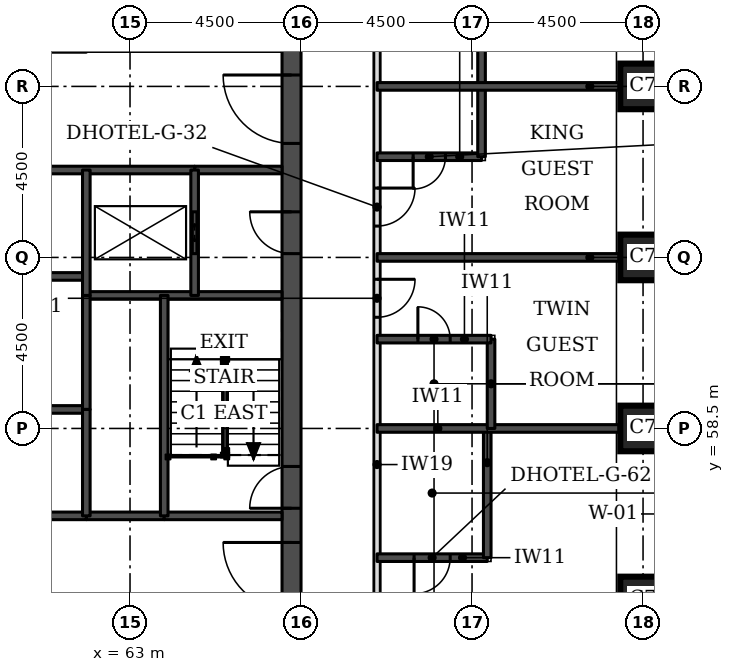
"""IFC4 building model, lengths in metres.
Left out: names, types, materials, properties, quantities, classifications, styles, units other than length and angle.
Written with IfcOpenShell. Run it as: python <this file> out.ifc"""

import sys

from ifc_helpers import new_model, si_unit, direction, frame, frame_2d, origin, origin_2d, place, context, subcontext, project, spatial, rectangle, extrude, element, fill, save


model = new_model("IFC4")
c1 = context("Model", 3, precision=1e-05, world=origin(), true_north=direction((0.0, 1.0)))
c2 = subcontext(c1, "Body", "Model", "MODEL_VIEW")
j1 = project(units=[si_unit("LENGTHUNIT", "METRE"), si_unit("PLANEANGLEUNIT", "RADIAN")], contexts=[c1])
p1 = place(None, origin())
s1 = spatial("IfcSite", under=j1, at=p1, CompositionType="ELEMENT")
p2 = place(p1, origin())
s2 = spatial("IfcBuilding", under=s1, at=p2, CompositionType="ELEMENT")
p3 = place(p2, frame((0.0, 0.0, 66.0)))
s3 = spatial("IfcBuildingStorey", under=s2, at=p3, CompositionType="ELEMENT", Elevation=66.0)
for number, where, z_axis, x_axis in (
    (1, (76.5, 54.0, 0.0), (0.0, 0.0, 1.0), (1.0, 0.0, 0.0)),
    (2, (76.5, 58.5, 0.0), (0.0, 0.0, 1.0), (1.0, 0.0, 0.0)),
    (3, (76.5, 63.0, 0.0), (0.0, 0.0, 1.0), (1.0, 0.0, 0.0)),
    (4, (76.5, 67.5, 0.0), (0.0, 0.0, 1.0), (1.0, 0.0, 0.0)),
):
    element("IfcColumn", number, at=place(p3, frame(where, z_axis=z_axis, x_axis=x_axis)), inside=s3, PredefinedType="COLUMN", context=c2, shape_type="SweptSolid", body=[
        extrude(rectangle(XDim=1.2, YDim=1.2, at=origin_2d()), origin(), (0.0, 0.0, 1.0), 3.3),
    ])
p4 = place(p3, frame((67.25, 49.5, 0.0), z_axis=(0.0, 0.0, 1.0), x_axis=(0.0, 1.0, 0.0)))
e5 = element("IfcWall", 5, at=p4, inside=s3, PredefinedType="SHEAR", context=c2, shape_type="SweptSolid", body=[
    extrude(rectangle(XDim=22.5, YDim=0.5, at=frame_2d((11.25, 0.0))), origin(), (0.0, 0.0, 1.0), 3.3),
])
p5 = place(p4, frame((4.2, 0.0, 0.0)))
e6 = element("IfcOpeningElement", 6, at=p5, cuts=e5, PredefinedType="OPENING", context=c2, shape_type="SweptSolid", body=[
    extrude(rectangle(XDim=1.8, YDim=2.1, at=frame_2d((0.9, 1.05))), frame((0.0, 0.26, 0.0), z_axis=(0.0, -1.0, 0.0), x_axis=(1.0, 0.0, 0.0)), (0.0, 0.0, 1.0), 0.52),
])
p6 = place(p4, frame((6.9, 0.0, 0.0)))
e7 = element("IfcOpeningElement", 7, at=p6, cuts=e5, PredefinedType="OPENING", context=c2, shape_type="SweptSolid", body=[
    extrude(rectangle(XDim=1.1, YDim=2.1, at=frame_2d((0.55, 1.05))), frame((0.0, 0.26, 0.0), z_axis=(0.0, -1.0, 0.0), x_axis=(1.0, 0.0, 0.0)), (0.0, 0.0, 1.0), 0.52),
])
p7 = place(p4, frame((13.6, 0.0, 0.0)))
e8 = element("IfcOpeningElement", 8, at=p7, cuts=e5, PredefinedType="OPENING", context=c2, shape_type="SweptSolid", body=[
    extrude(rectangle(XDim=1.1, YDim=2.1, at=frame_2d((0.55, 1.05))), frame((0.0, 0.26, 0.0), z_axis=(0.0, -1.0, 0.0), x_axis=(1.0, 0.0, 0.0)), (0.0, 0.0, 1.0), 0.52),
])
p8 = place(p4, frame((16.5, 0.0, 0.0)))
e9 = element("IfcOpeningElement", 9, at=p8, cuts=e5, PredefinedType="OPENING", context=c2, shape_type="SweptSolid", body=[
    extrude(rectangle(XDim=1.8, YDim=2.1, at=frame_2d((0.9, 1.05))), frame((0.0, 0.26, 0.0), z_axis=(0.0, -1.0, 0.0), x_axis=(1.0, 0.0, 0.0)), (0.0, 0.0, 1.0), 0.52),
])
p9 = place(p3, frame((69.5, 47.5, 0.0), z_axis=(0.0, 0.0, 1.0), x_axis=(0.0, 1.0, 0.0)))
e10 = element("IfcWall", 10, at=p9, inside=s3, PredefinedType="PARTITIONING", context=c2, shape_type="SweptSolid", body=[
    extrude(rectangle(XDim=26.5, YDim=0.15, at=frame_2d((13.25, 0.0))), origin(), (0.0, 0.0, 1.0), 3.08),
])
p10 = place(p9, frame((25.053, 0.0, 0.0)))
e11 = element("IfcOpeningElement", 11, at=p10, cuts=e10, PredefinedType="OPENING", context=c2, shape_type="SweptSolid", body=[
    extrude(rectangle(XDim=1.0, YDim=2.1, at=frame_2d((0.5, 1.05))), frame((0.0, 0.085, 0.0), z_axis=(0.0, -1.0, 0.0), x_axis=(1.0, 0.0, 0.0)), (0.0, 0.0, 1.0), 0.17),
])
p11 = place(p9, frame((22.925, 0.0, 0.0)))
e12 = element("IfcOpeningElement", 12, at=p11, cuts=e10, PredefinedType="OPENING", context=c2, shape_type="SweptSolid", body=[
    extrude(rectangle(XDim=1.0, YDim=2.1, at=frame_2d((0.5, 1.05))), frame((0.0, 0.085, 0.0), z_axis=(0.0, -1.0, 0.0), x_axis=(1.0, 0.0, 0.0)), (0.0, 0.0, 1.0), 0.17),
])
p12 = place(p9, frame((16.325, 0.0, 0.0)))
e13 = element("IfcOpeningElement", 13, at=p12, cuts=e10, PredefinedType="OPENING", context=c2, shape_type="SweptSolid", body=[
    extrude(rectangle(XDim=1.0, YDim=2.1, at=frame_2d((0.5, 1.05))), frame((0.0, 0.085, 0.0), z_axis=(0.0, -1.0, 0.0), x_axis=(1.0, 0.0, 0.0)), (0.0, 0.0, 1.0), 0.17),
])
p13 = place(p9, frame((13.925, 0.0, 0.0)))
e14 = element("IfcOpeningElement", 14, at=p13, cuts=e10, PredefinedType="OPENING", context=c2, shape_type="SweptSolid", body=[
    extrude(rectangle(XDim=1.0, YDim=2.1, at=frame_2d((0.5, 1.05))), frame((0.0, 0.085, 0.0), z_axis=(0.0, -1.0, 0.0), x_axis=(1.0, 0.0, 0.0)), (0.0, 0.0, 1.0), 0.17),
])
p14 = place(p9, frame((4.25, 0.0, 0.0)))
e15 = element("IfcOpeningElement", 15, at=p14, cuts=e10, PredefinedType="OPENING", context=c2, shape_type="SweptSolid", body=[
    extrude(rectangle(XDim=1.1, YDim=2.1, at=frame_2d((0.55, 1.05))), frame((0.0, 0.085, 0.0), z_axis=(0.0, -1.0, 0.0), x_axis=(1.0, 0.0, 0.0)), (0.0, 0.0, 1.0), 0.17),
])
p15 = place(p9, frame((0.447, 0.0, 0.0)))
e16 = element("IfcOpeningElement", 16, at=p15, cuts=e10, PredefinedType="OPENING", context=c2, shape_type="SweptSolid", body=[
    extrude(rectangle(XDim=1.0, YDim=2.1, at=frame_2d((0.5, 1.05))), frame((0.0, 0.085, 0.0), z_axis=(0.0, -1.0, 0.0), x_axis=(1.0, 0.0, 0.0)), (0.0, 0.0, 1.0), 0.17),
])
p16 = place(p3, frame((69.5, 55.1, 0.0), z_axis=(0.0, 0.0, 1.0), x_axis=(1.0, 0.0, 0.0)))
e17 = element("IfcWall", 17, at=p16, inside=s3, PredefinedType="SOLIDWALL", context=c2, shape_type="SweptSolid", body=[
    extrude(rectangle(XDim=2.9, YDim=0.2, at=frame_2d((1.45, 0.0))), origin(), (0.0, 0.0, 1.0), 3.08),
])
p17 = place(p16, frame((0.975, 0.0, 0.0)))
e18 = element("IfcOpeningElement", 18, at=p17, cuts=e17, PredefinedType="OPENING", context=c2, shape_type="SweptSolid", body=[
    extrude(rectangle(XDim=0.95, YDim=2.1, at=frame_2d((0.475, 1.05))), frame((0.0, 0.11, 0.0), z_axis=(0.0, -1.0, 0.0), x_axis=(1.0, 0.0, 0.0)), (0.0, 0.0, 1.0), 0.22),
])
p18 = place(p3, frame((72.4, 55.1, 0.0), z_axis=(0.0, 0.0, 1.0), x_axis=(0.0, 1.0, 0.0)))
e19 = element("IfcWall", 19, at=p18, inside=s3, PredefinedType="SOLIDWALL", context=c2, shape_type="SweptSolid", body=[
    extrude(rectangle(XDim=3.4, YDim=0.2, at=frame_2d((1.7, 0.0))), origin(), (0.0, 0.0, 1.0), 3.08),
])
p19 = place(p3, frame((69.5, 58.5, 0.0), z_axis=(0.0, 0.0, 1.0), x_axis=(1.0, 0.0, 0.0)))
e20 = element("IfcWall", 20, at=p19, inside=s3, PredefinedType="SOLIDWALL", context=c2, shape_type="SweptSolid", body=[
    extrude(rectangle(XDim=6.4, YDim=0.2, at=frame_2d((3.2, 0.0))), origin(), (0.0, 0.0, 1.0), 3.08),
])
p20 = place(p3, frame((72.5, 58.5, 0.0), z_axis=(0.0, 0.0, 1.0), x_axis=(0.0, 1.0, 0.0)))
e21 = element("IfcWall", 21, at=p20, inside=s3, PredefinedType="SOLIDWALL", context=c2, shape_type="SweptSolid", body=[
    extrude(rectangle(XDim=2.35, YDim=0.2, at=frame_2d((1.175, 0.0))), origin(), (0.0, 0.0, 1.0), 3.08),
])
p21 = place(p3, frame((69.5, 60.85, 0.0), z_axis=(0.0, 0.0, 1.0), x_axis=(1.0, 0.0, 0.0)))
e22 = element("IfcWall", 22, at=p21, inside=s3, PredefinedType="SOLIDWALL", context=c2, shape_type="SweptSolid", body=[
    extrude(rectangle(XDim=3.0, YDim=0.2, at=frame_2d((1.5, 0.0))), origin(), (0.0, 0.0, 1.0), 3.08),
])
p22 = place(p21, frame((1.075, 0.0, 0.0)))
e23 = element("IfcOpeningElement", 23, at=p22, cuts=e22, PredefinedType="OPENING", context=c2, shape_type="SweptSolid", body=[
    extrude(rectangle(XDim=0.85, YDim=2.1, at=frame_2d((0.425, 1.05))), frame((0.0, 0.11, 0.0), z_axis=(0.0, -1.0, 0.0), x_axis=(1.0, 0.0, 0.0)), (0.0, 0.0, 1.0), 0.22),
])
p23 = place(p3, frame((69.5, 63.0, 0.0), z_axis=(0.0, 0.0, 1.0), x_axis=(1.0, 0.0, 0.0)))
e24 = element("IfcWall", 24, at=p23, inside=s3, PredefinedType="SOLIDWALL", context=c2, shape_type="SweptSolid", body=[
    extrude(rectangle(XDim=6.4, YDim=0.2, at=frame_2d((3.2, 0.0))), origin(), (0.0, 0.0, 1.0), 3.08),
])
p24 = place(p3, frame((69.5, 65.65, 0.0), z_axis=(0.0, 0.0, 1.0), x_axis=(1.0, 0.0, 0.0)))
e25 = element("IfcWall", 25, at=p24, inside=s3, PredefinedType="SOLIDWALL", context=c2, shape_type="SweptSolid", body=[
    extrude(rectangle(XDim=2.75, YDim=0.2, at=frame_2d((1.375, 0.0))), origin(), (0.0, 0.0, 1.0), 3.08),
])
p25 = place(p24, frame((0.95, 0.0, 0.0)))
e26 = element("IfcOpeningElement", 26, at=p25, cuts=e25, PredefinedType="OPENING", context=c2, shape_type="SweptSolid", body=[
    extrude(rectangle(XDim=0.85, YDim=2.1, at=frame_2d((0.425, 1.05))), frame((0.0, 0.11, 0.0), z_axis=(0.0, -1.0, 0.0), x_axis=(1.0, 0.0, 0.0)), (0.0, 0.0, 1.0), 0.22),
])
p26 = place(p3, frame((72.25, 65.65, 0.0), z_axis=(0.0, 0.0, 1.0), x_axis=(0.0, 1.0, 0.0)))
e27 = element("IfcWall", 27, at=p26, inside=s3, PredefinedType="SOLIDWALL", context=c2, shape_type="SweptSolid", body=[
    extrude(rectangle(XDim=4.2, YDim=0.2, at=frame_2d((2.1, 0.0))), origin(), (0.0, 0.0, 1.0), 3.08),
])
p27 = place(p3, frame((69.5, 67.5, 0.0), z_axis=(0.0, 0.0, 1.0), x_axis=(1.0, 0.0, 0.0)))
e28 = element("IfcWall", 28, at=p27, inside=s3, PredefinedType="SOLIDWALL", context=c2, shape_type="SweptSolid", body=[
    extrude(rectangle(XDim=6.4, YDim=0.2, at=frame_2d((3.2, 0.0))), origin(), (0.0, 0.0, 1.0), 3.08),
])
p28 = place(p3, frame((61.85, 56.2, 0.0), z_axis=(0.0, 0.0, 1.0), x_axis=(1.0, 0.0, 0.0)))
e29 = element("IfcWall", 29, at=p28, inside=s3, PredefinedType="SOLIDWALL", context=c2, shape_type="SweptSolid", body=[
    extrude(rectangle(XDim=2.05, YDim=0.2, at=frame_2d((1.025, 0.0))), origin(), (0.0, 0.0, 1.0), 3.08),
])
p29 = place(p3, frame((50.65, 56.2, 0.0), z_axis=(0.0, 0.0, 1.0), x_axis=(1.0, 0.0, 0.0)))
e30 = element("IfcWall", 30, at=p29, inside=s3, PredefinedType="SOLIDWALL", context=c2, shape_type="SweptSolid", body=[
    extrude(rectangle(XDim=11.2, YDim=0.2, at=frame_2d((5.6, 0.0))), origin(), (0.0, 0.0, 1.0), 3.08),
])
p30 = place(p3, frame((63.9, 56.2, 0.0), z_axis=(0.0, 0.0, 1.0), x_axis=(1.0, 0.0, 0.0)))
e31 = element("IfcWall", 31, at=p30, inside=s3, PredefinedType="SOLIDWALL", context=c2, shape_type="SweptSolid", body=[
    extrude(rectangle(XDim=3.1, YDim=0.2, at=frame_2d((1.55, 0.0))), origin(), (0.0, 0.0, 1.0), 3.08),
])
p31 = place(p3, frame((50.65, 59.0, 0.0), z_axis=(0.0, 0.0, 1.0), x_axis=(1.0, 0.0, 0.0)))
e32 = element("IfcWall", 32, at=p31, inside=s3, PredefinedType="SOLIDWALL", context=c2, shape_type="SweptSolid", body=[
    extrude(rectangle(XDim=11.2, YDim=0.2, at=frame_2d((5.6, 0.0))), origin(), (0.0, 0.0, 1.0), 3.3),
])
p32 = place(p3, frame((61.85, 62.0, 0.0), z_axis=(0.0, 0.0, 1.0), x_axis=(1.0, 0.0, 0.0)))
e33 = element("IfcWall", 33, at=p32, inside=s3, PredefinedType="SOLIDWALL", context=c2, shape_type="SweptSolid", body=[
    extrude(rectangle(XDim=5.15, YDim=0.2, at=frame_2d((2.575, 0.0))), origin(), (0.0, 0.0, 1.0), 3.08),
])
p33 = place(p3, frame((50.65, 62.5, 0.0), z_axis=(0.0, 0.0, 1.0), x_axis=(1.0, 0.0, 0.0)))
e34 = element("IfcWall", 34, at=p33, inside=s3, PredefinedType="SOLIDWALL", context=c2, shape_type="SweptSolid", body=[
    extrude(rectangle(XDim=11.2, YDim=0.2, at=frame_2d((5.6, 0.0))), origin(), (0.0, 0.0, 1.0), 3.3),
])
p34 = place(p3, frame((64.7, 65.3, 0.0), z_axis=(0.0, 0.0, 1.0), x_axis=(1.0, 0.0, 0.0)))
e35 = element("IfcWall", 35, at=p34, inside=s3, PredefinedType="SOLIDWALL", context=c2, shape_type="SweptSolid", body=[
    extrude(rectangle(XDim=2.3, YDim=0.2, at=frame_2d((1.15, 0.0))), origin(), (0.0, 0.0, 1.0), 3.08),
])
p35 = place(p3, frame((47.8, 65.3, 0.0), z_axis=(0.0, 0.0, 1.0), x_axis=(1.0, 0.0, 0.0)))
e36 = element("IfcWall", 36, at=p35, inside=s3, PredefinedType="SOLIDWALL", context=c2, shape_type="SweptSolid", body=[
    extrude(rectangle(XDim=16.9, YDim=0.2, at=frame_2d((8.45, 0.0))), origin(), (0.0, 0.0, 1.0), 3.08),
])
p36 = place(p3, frame((61.85, 59.0, 0.0), z_axis=(0.0, 0.0, 1.0), x_axis=(0.0, 1.0, 0.0)))
e37 = element("IfcWall", 37, at=p36, inside=s3, PredefinedType="SOLIDWALL", context=c2, shape_type="SweptSolid", body=[
    extrude(rectangle(XDim=3.0, YDim=0.2, at=frame_2d((1.5, 0.0))), origin(), (0.0, 0.0, 1.0), 3.3),
])
p37 = place(p3, frame((61.85, 56.2, 0.0), z_axis=(0.0, 0.0, 1.0), x_axis=(0.0, 1.0, 0.0)))
e38 = element("IfcWall", 38, at=p37, inside=s3, PredefinedType="SOLIDWALL", context=c2, shape_type="SweptSolid", body=[
    extrude(rectangle(XDim=2.8, YDim=0.2, at=frame_2d((1.4, 0.0))), origin(), (0.0, 0.0, 1.0), 3.08),
])
p38 = place(p3, frame((61.85, 62.0, 0.0), z_axis=(0.0, 0.0, 1.0), x_axis=(0.0, 1.0, 0.0)))
e39 = element("IfcWall", 39, at=p38, inside=s3, PredefinedType="SOLIDWALL", context=c2, shape_type="SweptSolid", body=[
    extrude(rectangle(XDim=3.3, YDim=0.2, at=frame_2d((1.65, 0.0))), origin(), (0.0, 0.0, 1.0), 3.08),
])
p39 = place(p3, frame((63.9, 56.2, 0.0), z_axis=(0.0, 0.0, 1.0), x_axis=(0.0, 1.0, 0.0)))
e40 = element("IfcWall", 40, at=p39, inside=s3, PredefinedType="SOLIDWALL", context=c2, shape_type="SweptSolid", body=[
    extrude(rectangle(XDim=5.8, YDim=0.2, at=frame_2d((2.9, 0.0))), origin(), (0.0, 0.0, 1.0), 3.08),
])
p40 = place(p3, frame((64.7, 62.0, 0.0), z_axis=(0.0, 0.0, 1.0), x_axis=(0.0, 1.0, 0.0)))
e41 = element("IfcWall", 41, at=p40, inside=s3, PredefinedType="SOLIDWALL", context=c2, shape_type="SweptSolid", body=[
    extrude(rectangle(XDim=3.3, YDim=0.2, at=frame_2d((1.65, 0.0))), origin(), (0.0, 0.0, 1.0), 3.08),
])
p41 = place(p40, frame((1.1, 0.0, 0.0)))
e42 = element("IfcOpeningElement", 42, at=p41, cuts=e41, PredefinedType="OPENING", context=c2, shape_type="SweptSolid", body=[
    extrude(rectangle(XDim=1.1, YDim=2.1, at=frame_2d((0.55, 1.05))), frame((0.0, 0.11, 0.0), z_axis=(0.0, -1.0, 0.0), x_axis=(1.0, 0.0, 0.0)), (0.0, 0.0, 1.0), 0.22),
])
p42 = place(p12, frame((1.0, 0.0, 0.0), z_axis=(0.0, 0.0, 1.0), x_axis=(-1.0, 0.0, 0.0)))
e43 = element("IfcDoor", 43, at=p42, inside=s3, OperationType="SINGLE_SWING_LEFT", PredefinedType="DOOR", context=c2, shape_type="SweptSolid", body=[
    extrude(rectangle(XDim=1.0, YDim=2.1, at=frame_2d((0.5, 1.05))), frame((0.0, 0.025, 0.0), z_axis=(0.0, -1.0, 0.0), x_axis=(1.0, 0.0, 0.0)), (0.0, 0.0, 1.0), 0.05),
])
fill(e13, e43)
p43 = place(p25, frame((0.85, 0.0, 0.0), z_axis=(0.0, 0.0, 1.0), x_axis=(-1.0, 0.0, 0.0)))
e44 = element("IfcDoor", 44, at=p43, inside=s3, OperationType="SINGLE_SWING_RIGHT", PredefinedType="DOOR", context=c2, shape_type="SweptSolid", body=[
    extrude(rectangle(XDim=0.85, YDim=2.1, at=frame_2d((0.425, 1.05))), frame((0.0, 0.025, 0.0), z_axis=(0.0, -1.0, 0.0), x_axis=(1.0, 0.0, 0.0)), (0.0, 0.0, 1.0), 0.05),
])
fill(e26, e44)
p44 = place(p13, frame((1.0, 0.0, 0.0), z_axis=(0.0, 0.0, 1.0), x_axis=(-1.0, 0.0, 0.0)))
e45 = element("IfcDoor", 45, at=p44, inside=s3, OperationType="SINGLE_SWING_LEFT", PredefinedType="DOOR", context=c2, shape_type="SweptSolid", body=[
    extrude(rectangle(XDim=1.0, YDim=2.1, at=frame_2d((0.5, 1.05))), frame((0.0, 0.025, 0.0), z_axis=(0.0, -1.0, 0.0), x_axis=(1.0, 0.0, 0.0)), (0.0, 0.0, 1.0), 0.05),
])
fill(e14, e45)
p45 = place(p22, origin())
e46 = element("IfcDoor", 46, at=p45, inside=s3, OperationType="SINGLE_SWING_LEFT", PredefinedType="DOOR", context=c2, shape_type="SweptSolid", body=[
    extrude(rectangle(XDim=0.85, YDim=2.1, at=frame_2d((0.425, 1.05))), frame((0.0, 0.025, 0.0), z_axis=(0.0, -1.0, 0.0), x_axis=(1.0, 0.0, 0.0)), (0.0, 0.0, 1.0), 0.05),
])
fill(e23, e46)
p46 = place(p17, frame((0.95, 0.0, 0.0), z_axis=(0.0, 0.0, 1.0), x_axis=(-1.0, 0.0, 0.0)))
e47 = element("IfcDoor", 47, at=p46, inside=s3, OperationType="SINGLE_SWING_RIGHT", PredefinedType="DOOR", context=c2, shape_type="SweptSolid", body=[
    extrude(rectangle(XDim=0.95, YDim=2.1, at=frame_2d((0.475, 1.05))), frame((0.0, 0.025, 0.0), z_axis=(0.0, -1.0, 0.0), x_axis=(1.0, 0.0, 0.0)), (0.0, 0.0, 1.0), 0.05),
])
fill(e18, e47)
p47 = place(p41, origin())
e48 = element("IfcDoor", 48, at=p47, inside=s3, OperationType="DOUBLE_DOOR_SLIDING", PredefinedType="DOOR", context=c2, shape_type="SweptSolid", body=[
    extrude(rectangle(XDim=1.1, YDim=2.1, at=frame_2d((0.55, 1.05))), frame((0.0, 0.025, 0.0), z_axis=(0.0, -1.0, 0.0), x_axis=(1.0, 0.0, 0.0)), (0.0, 0.0, 1.0), 0.05),
])
fill(e42, e48)
p48 = place(p5, origin())
e49 = element("IfcDoor", 49, at=p48, inside=s3, OperationType="SINGLE_SWING_RIGHT", PredefinedType="DOOR", context=c2, shape_type="SweptSolid", body=[
    extrude(rectangle(XDim=1.8, YDim=2.1, at=frame_2d((0.9, 1.05))), frame((0.0, 0.025, 0.0), z_axis=(0.0, -1.0, 0.0), x_axis=(1.0, 0.0, 0.0)), (0.0, 0.0, 1.0), 0.05),
])
fill(e6, e49)
p49 = place(p6, origin())
e50 = element("IfcDoor", 50, at=p49, inside=s3, OperationType="SINGLE_SWING_LEFT", PredefinedType="DOOR", context=c2, shape_type="SweptSolid", body=[
    extrude(rectangle(XDim=1.1, YDim=2.1, at=frame_2d((0.55, 1.05))), frame((0.0, 0.025, 0.0), z_axis=(0.0, -1.0, 0.0), x_axis=(1.0, 0.0, 0.0)), (0.0, 0.0, 1.0), 0.05),
])
fill(e7, e50)
p50 = place(p7, origin())
e51 = element("IfcDoor", 51, at=p50, inside=s3, OperationType="SINGLE_SWING_RIGHT", PredefinedType="DOOR", context=c2, shape_type="SweptSolid", body=[
    extrude(rectangle(XDim=1.1, YDim=2.1, at=frame_2d((0.55, 1.05))), frame((0.0, 0.025, 0.0), z_axis=(0.0, -1.0, 0.0), x_axis=(1.0, 0.0, 0.0)), (0.0, 0.0, 1.0), 0.05),
])
fill(e8, e51)
p51 = place(p8, origin())
e52 = element("IfcDoor", 52, at=p51, inside=s3, OperationType="SINGLE_SWING_RIGHT", PredefinedType="DOOR", context=c2, shape_type="SweptSolid", body=[
    extrude(rectangle(XDim=1.8, YDim=2.1, at=frame_2d((0.9, 1.05))), frame((0.0, 0.025, 0.0), z_axis=(0.0, -1.0, 0.0), x_axis=(1.0, 0.0, 0.0)), (0.0, 0.0, 1.0), 0.05),
])
fill(e9, e52)
save(model, sys.argv[1])
